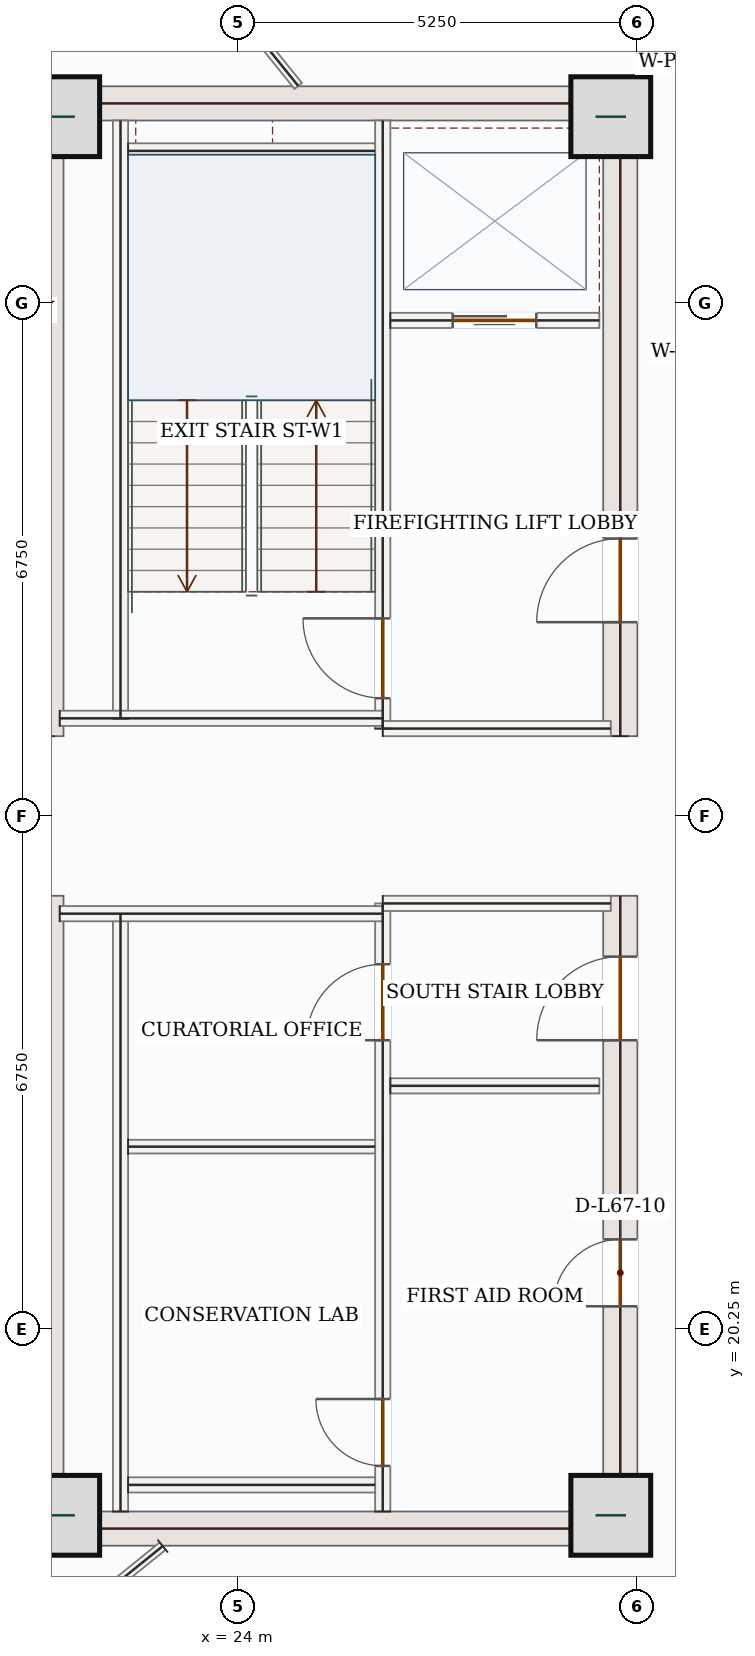
"""IFC4 building model, lengths in metres.
Left out: names, types, materials, properties, quantities, classifications, styles, units other than length and angle.
Written with IfcOpenShell. Run it as: python <this file> out.ifc"""

import sys

from ifc_helpers import new_model, si_unit, direction, frame, frame_2d, origin, origin_2d, place, context, subcontext, project, spatial, rectangle, extrude, source, transform, mapped, element, fill, save


model = new_model("IFC4")
c1 = context("Model", 3, precision=1e-05, world=origin(), true_north=direction((0.0, 1.0)))
c2 = subcontext(c1, "Body", "Model", "MODEL_VIEW")
j1 = project(units=[si_unit("LENGTHUNIT", "METRE"), si_unit("PLANEANGLEUNIT", "RADIAN")], contexts=[c1])
p1 = place(None, origin())
s1 = spatial("IfcSite", under=j1, at=p1, CompositionType="ELEMENT")
p2 = place(p1, origin())
s2 = spatial("IfcBuilding", under=s1, at=p2, CompositionType="ELEMENT")
p3 = place(p2, frame((0.0, 0.0, 280.35)))
s3 = spatial("IfcBuildingStorey", under=s2, at=p3, CompositionType="ELEMENT", Elevation=280.35)
m1 = source(origin(), c2, "Body", "SweptSolid", [
    extrude(rectangle(XDim=8.55, YDim=0.45, at=frame_2d((4.275, 0.0))), origin(), (0.0, 0.0, 1.0), 3.5),
])
for number, where, z_axis, x_axis in (
    (1, (21.475, 17.4, 0.0), (0.0, 0.0, 1.0), (0.0, 1.0, 0.0)),
    (2, (21.475, 28.05, 0.0), (0.0, 0.0, 1.0), (0.0, 1.0, 0.0)),
):
    element("IfcWall", number, at=place(p3, frame(where, z_axis=z_axis, x_axis=x_axis)), inside=s3, PredefinedType="SHEAR", context=c2, shape_type="MappedRepresentation", body=[
        mapped(m1, transform((0.0, 0.0, 0.0), x_axis=(1.0, 0.0, 0.0), y_axis=(0.0, 1.0, 0.0), z_axis=(0.0, 0.0, 1.0), scale=1.0)),
    ])
p4 = place(p3, frame((29.025, 17.4, 0.0), z_axis=(0.0, 0.0, 1.0), x_axis=(0.0, 1.0, 0.0)))
e3 = element("IfcWall", 3, at=p4, inside=s3, PredefinedType="SHEAR", context=c2, shape_type="SweptSolid", body=[
    extrude(rectangle(XDim=8.55, YDim=0.45, at=frame_2d((4.275, 0.0))), origin(), (0.0, 0.0, 1.0), 3.5),
])
p5 = place(p4, frame((6.65, 0.0, 0.0)))
e4 = element("IfcOpeningElement", 4, at=p5, cuts=e3, PredefinedType="OPENING", context=c2, shape_type="SweptSolid", body=[
    extrude(rectangle(XDim=1.1, YDim=2.2, at=frame_2d((0.55, 1.1))), frame((0.0, 0.235, 0.0), z_axis=(0.0, -1.0, 0.0), x_axis=(1.0, 0.0, 0.0)), (0.0, 0.0, 1.0), 0.47),
])
p6 = place(p4, frame((3.15, 0.0, 0.0)))
e5 = element("IfcOpeningElement", 5, at=p6, cuts=e3, PredefinedType="OPENING", context=c2, shape_type="SweptSolid", body=[
    extrude(rectangle(XDim=0.88, YDim=2.1, at=frame_2d((0.44, 1.05))), frame((0.0, 0.235, 0.0), z_axis=(0.0, -1.0, 0.0), x_axis=(1.0, 0.0, 0.0)), (0.0, 0.0, 1.0), 0.47),
])
p7 = place(p3, frame((29.025, 28.05, 0.0), z_axis=(0.0, 0.0, 1.0), x_axis=(0.0, 1.0, 0.0)))
e6 = element("IfcWall", 6, at=p7, inside=s3, PredefinedType="SHEAR", context=c2, shape_type="SweptSolid", body=[
    extrude(rectangle(XDim=8.55, YDim=0.45, at=frame_2d((4.275, 0.0))), origin(), (0.0, 0.0, 1.0), 3.5),
])
p8 = place(p7, frame((1.5, 0.0, 0.0)))
e7 = element("IfcOpeningElement", 7, at=p8, cuts=e6, PredefinedType="OPENING", context=c2, shape_type="SweptSolid", body=[
    extrude(rectangle(XDim=1.1, YDim=2.2, at=frame_2d((0.55, 1.1))), frame((0.0, 0.235, 0.0), z_axis=(0.0, -1.0, 0.0), x_axis=(1.0, 0.0, 0.0)), (0.0, 0.0, 1.0), 0.47),
])
m2 = source(origin(), c2, "Body", "SweptSolid", [
    extrude(rectangle(XDim=7.1, YDim=0.45, at=frame_2d((3.55, 0.0))), origin(), (0.0, 0.0, 1.0), 3.5),
])
for number, where, z_axis, x_axis in (
    (8, (21.7, 17.625, 0.0), (0.0, 0.0, 1.0), (1.0, 0.0, 0.0)),
    (9, (21.7, 36.375, 0.0), (0.0, 0.0, 1.0), (1.0, 0.0, 0.0)),
):
    element("IfcWall", number, at=place(p3, frame(where, z_axis=z_axis, x_axis=x_axis)), inside=s3, PredefinedType="SHEAR", context=c2, shape_type="MappedRepresentation", body=[
        mapped(m2, transform((0.0, 0.0, 0.0), x_axis=(1.0, 0.0, 0.0), y_axis=(0.0, 1.0, 0.0), z_axis=(0.0, 0.0, 1.0), scale=1.0)),
    ])
m3 = source(origin(), c2, "Body", "SweptSolid", [
    extrude(rectangle(XDim=1.05, YDim=1.05, at=origin_2d()), origin(), (0.0, 0.0, 1.0), 3.75),
])
for number, where, z_axis, x_axis in (
    (10, (21.65, 17.8, 0.0), (0.0, 0.0, 1.0), (1.0, 0.0, 0.0)),
    (11, (28.9, 17.8, 0.0), (0.0, 0.0, 1.0), (1.0, 0.0, 0.0)),
    (12, (21.65, 36.2, 0.0), (0.0, 0.0, 1.0), (1.0, 0.0, 0.0)),
    (13, (28.9, 36.2, 0.0), (0.0, 0.0, 1.0), (1.0, 0.0, 0.0)),
):
    element("IfcColumn", number, at=place(p3, frame(where, z_axis=z_axis, x_axis=x_axis)), inside=s3, PredefinedType="COLUMN", context=c2, shape_type="MappedRepresentation", body=[
        mapped(m3, transform((0.0, 0.0, 0.0), x_axis=(1.0, 0.0, 0.0), y_axis=(0.0, 1.0, 0.0), z_axis=(0.0, 0.0, 1.0), scale=1.0)),
    ])
m4 = source(origin(), c2, "Body", "SweptSolid", [
    extrude(rectangle(XDim=3.96, YDim=0.28, at=frame_2d((1.98, 0.0))), origin(), (0.0, 0.0, 1.0), 3.5),
])
p9 = place(p3, frame((21.74, 15.658, 0.0), z_axis=(0.0, 0.0, 1.0), x_axis=(-0.707106781187, 0.707106781187, 0.0)))
e14 = element("IfcWall", 14, at=p9, inside=s3, PredefinedType="SOLIDWALL", context=c2, shape_type="MappedRepresentation", body=[
    mapped(m4, transform((0.0, 0.0, 0.0), x_axis=(1.0, 0.0, 0.0), y_axis=(0.0, 1.0, 0.0), z_axis=(0.0, 0.0, 1.0), scale=1.0)),
])
m5 = source(origin(), c2, "Body", "SweptSolid", [
    extrude(rectangle(XDim=7.87, YDim=0.2, at=frame_2d((3.935, 0.0))), origin(), (0.0, 0.0, 1.0), 3.5),
])
for number, where, z_axis, x_axis in (
    (15, (22.45, 17.85, 0.0), (0.0, 0.0, 1.0), (0.0, 1.0, 0.0)),
    (16, (22.45, 28.28, 0.0), (0.0, 0.0, 1.0), (0.0, 1.0, 0.0)),
):
    element("IfcWall", number, at=place(p3, frame(where, z_axis=z_axis, x_axis=x_axis)), inside=s3, PredefinedType="SOLIDWALL", context=c2, shape_type="MappedRepresentation", body=[
        mapped(m5, transform((0.0, 0.0, 0.0), x_axis=(1.0, 0.0, 0.0), y_axis=(0.0, 1.0, 0.0), z_axis=(0.0, 0.0, 1.0), scale=1.0)),
    ])
p10 = place(p3, frame((25.9, 17.85, 0.0), z_axis=(0.0, 0.0, 1.0), x_axis=(0.0, 1.0, 0.0)))
e17 = element("IfcWall", 17, at=p10, inside=s3, PredefinedType="SOLIDWALL", context=c2, shape_type="SweptSolid", body=[
    extrude(rectangle(XDim=8.0, YDim=0.2, at=frame_2d((4.0, 0.0))), origin(), (0.0, 0.0, 1.0), 3.5),
])
p11 = place(p10, frame((6.2, 0.0, 0.0)))
e18 = element("IfcOpeningElement", 18, at=p11, cuts=e17, PredefinedType="OPENING", context=c2, shape_type="SweptSolid", body=[
    extrude(rectangle(XDim=1.0, YDim=2.15, at=frame_2d((0.5, 1.075))), frame((0.0, 0.11, 0.0), z_axis=(0.0, -1.0, 0.0), x_axis=(1.0, 0.0, 0.0)), (0.0, 0.0, 1.0), 0.22),
])
p12 = place(p10, frame((0.6, 0.0, 0.0)))
e19 = element("IfcOpeningElement", 19, at=p12, cuts=e17, PredefinedType="OPENING", context=c2, shape_type="SweptSolid", body=[
    extrude(rectangle(XDim=0.88, YDim=2.1, at=frame_2d((0.44, 1.05))), frame((0.0, 0.11, 0.0), z_axis=(0.0, -1.0, 0.0), x_axis=(1.0, 0.0, 0.0)), (0.0, 0.0, 1.0), 0.22),
])
p13 = place(p3, frame((25.9, 28.15, 0.0), z_axis=(0.0, 0.0, 1.0), x_axis=(0.0, 1.0, 0.0)))
e20 = element("IfcWall", 20, at=p13, inside=s3, PredefinedType="SOLIDWALL", context=c2, shape_type="SweptSolid", body=[
    extrude(rectangle(XDim=8.0, YDim=0.2, at=frame_2d((4.0, 0.0))), origin(), (0.0, 0.0, 1.0), 3.5),
])
p14 = place(p13, frame((0.4, 0.0, 0.0)))
e21 = element("IfcOpeningElement", 21, at=p14, cuts=e20, PredefinedType="OPENING", context=c2, shape_type="SweptSolid", body=[
    extrude(rectangle(XDim=1.05, YDim=2.15, at=frame_2d((0.525, 1.075))), frame((0.0, 0.11, 0.0), z_axis=(0.0, -1.0, 0.0), x_axis=(1.0, 0.0, 0.0)), (0.0, 0.0, 1.0), 0.22),
])
m6 = source(origin(), c2, "Body", "SweptSolid", [
    extrude(rectangle(XDim=4.25, YDim=0.2, at=frame_2d((2.125, 0.0))), origin(), (0.0, 0.0, 1.0), 3.5),
])
p15 = place(p3, frame((21.65, 25.715, 0.0), z_axis=(0.0, 0.0, 1.0), x_axis=(1.0, 0.0, 0.0)))
e22 = element("IfcWall", 22, at=p15, inside=s3, PredefinedType="SOLIDWALL", context=c2, shape_type="MappedRepresentation", body=[
    mapped(m6, transform((0.0, 0.0, 0.0), x_axis=(1.0, 0.0, 0.0), y_axis=(0.0, 1.0, 0.0), z_axis=(0.0, 0.0, 1.0), scale=1.0)),
])
m7 = source(origin(), c2, "Body", "SweptSolid", [
    extrude(rectangle(XDim=3.0, YDim=0.2, at=frame_2d((1.5, 0.0))), origin(), (0.0, 0.0, 1.0), 3.5),
])
p16 = place(p3, frame((25.9, 25.85, 0.0), z_axis=(0.0, 0.0, 1.0), x_axis=(1.0, 0.0, 0.0)))
e23 = element("IfcWall", 23, at=p16, inside=s3, PredefinedType="SOLIDWALL", context=c2, shape_type="MappedRepresentation", body=[
    mapped(m7, transform((0.0, 0.0, 0.0), x_axis=(1.0, 0.0, 0.0), y_axis=(0.0, 1.0, 0.0), z_axis=(0.0, 0.0, 1.0), scale=1.0)),
])
p17 = place(p3, frame((21.65, 28.285, 0.0), z_axis=(0.0, 0.0, 1.0), x_axis=(1.0, 0.0, 0.0)))
e24 = element("IfcWall", 24, at=p17, inside=s3, PredefinedType="SOLIDWALL", context=c2, shape_type="MappedRepresentation", body=[
    mapped(m6, transform((0.0, 0.0, 0.0), x_axis=(1.0, 0.0, 0.0), y_axis=(0.0, 1.0, 0.0), z_axis=(0.0, 0.0, 1.0), scale=1.0)),
])
p18 = place(p3, frame((25.9, 28.15, 0.0), z_axis=(0.0, 0.0, 1.0), x_axis=(1.0, 0.0, 0.0)))
e25 = element("IfcWall", 25, at=p18, inside=s3, PredefinedType="SOLIDWALL", context=c2, shape_type="MappedRepresentation", body=[
    mapped(m7, transform((0.0, 0.0, 0.0), x_axis=(1.0, 0.0, 0.0), y_axis=(0.0, 1.0, 0.0), z_axis=(0.0, 0.0, 1.0), scale=1.0)),
])
m8 = source(origin(), c2, "Body", "SweptSolid", [
    extrude(rectangle(XDim=3.25, YDim=0.2, at=frame_2d((1.625, 0.0))), origin(), (0.0, 0.0, 1.0), 3.5),
])
for number, where, z_axis, x_axis in (
    (26, (22.55, 35.75, 0.0), (0.0, 0.0, 1.0), (1.0, 0.0, 0.0)),
    (27, (22.55, 18.2, 0.0), (0.0, 0.0, 1.0), (1.0, 0.0, 0.0)),
):
    element("IfcWall", number, at=place(p3, frame(where, z_axis=z_axis, x_axis=x_axis)), inside=s3, PredefinedType="SOLIDWALL", context=c2, shape_type="MappedRepresentation", body=[
        mapped(m8, transform((0.0, 0.0, 0.0), x_axis=(1.0, 0.0, 0.0), y_axis=(0.0, 1.0, 0.0), z_axis=(0.0, 0.0, 1.0), scale=1.0)),
    ])
m9 = source(origin(), c2, "Body", "SweptSolid", [
    extrude(rectangle(XDim=3.25, YDim=0.18, at=frame_2d((1.625, 0.0))), origin(), (0.0, 0.0, 1.0), 3.5),
])
p19 = place(p3, frame((22.55, 22.65, 0.0), z_axis=(0.0, 0.0, 1.0), x_axis=(1.0, 0.0, 0.0)))
e28 = element("IfcWall", 28, at=p19, inside=s3, PredefinedType="PARTITIONING", context=c2, shape_type="MappedRepresentation", body=[
    mapped(m9, transform((0.0, 0.0, 0.0), x_axis=(1.0, 0.0, 0.0), y_axis=(0.0, 1.0, 0.0), z_axis=(0.0, 0.0, 1.0), scale=1.0)),
])
p20 = place(p3, frame((26.0, 33.52, 0.0), z_axis=(0.0, 0.0, 1.0), x_axis=(1.0, 0.0, 0.0)))
e29 = element("IfcWall", 29, at=p20, inside=s3, PredefinedType="SOLIDWALL", context=c2, shape_type="SweptSolid", body=[
    extrude(rectangle(XDim=2.75, YDim=0.2, at=frame_2d((1.375, 0.0))), origin(), (0.0, 0.0, 1.0), 3.5),
])
p21 = place(p20, frame((0.82, 0.0, 0.0)))
e30 = element("IfcOpeningElement", 30, at=p21, cuts=e29, PredefinedType="OPENING", context=c2, shape_type="SweptSolid", body=[
    extrude(rectangle(XDim=1.1, YDim=2.15, at=frame_2d((0.55, 1.075))), frame((0.0, 0.11, 0.0), z_axis=(0.0, -1.0, 0.0), x_axis=(1.0, 0.0, 0.0)), (0.0, 0.0, 1.0), 0.22),
])
m10 = source(origin(), c2, "Body", "SweptSolid", [
    extrude(rectangle(XDim=2.75, YDim=0.2, at=frame_2d((1.375, 0.0))), origin(), (0.0, 0.0, 1.0), 3.5),
])
p22 = place(p3, frame((26.0, 23.45, 0.0), z_axis=(0.0, 0.0, 1.0), x_axis=(1.0, 0.0, 0.0)))
e31 = element("IfcWall", 31, at=p22, inside=s3, PredefinedType="SOLIDWALL", context=c2, shape_type="MappedRepresentation", body=[
    mapped(m10, transform((0.0, 0.0, 0.0), x_axis=(1.0, 0.0, 0.0), y_axis=(0.0, 1.0, 0.0), z_axis=(0.0, 0.0, 1.0), scale=1.0)),
])
m11 = source(origin(), c2, "Body", "SweptSolid", [
    extrude(rectangle(XDim=1.989, YDim=0.125, at=frame_2d((0.995, 0.0))), origin(), (0.0, 0.0, 1.0), 3.5),
])
p23 = place(p3, frame((23.005, 17.395, 0.0), z_axis=(0.0, 0.0, 1.0), x_axis=(-0.778058853423, -0.628191388519, 0.0)))
e32 = element("IfcWall", 32, at=p23, inside=s3, PredefinedType="PARTITIONING", context=c2, shape_type="MappedRepresentation", body=[
    mapped(m11, transform((0.0, 0.0, 0.0), x_axis=(1.0, 0.0, 0.0), y_axis=(0.0, 1.0, 0.0), z_axis=(0.0, 0.0, 1.0), scale=1.0)),
])
m12 = source(origin(), c2, "Body", "SweptSolid", [
    extrude(rectangle(XDim=2.089, YDim=0.125, at=frame_2d((1.045, 0.0))), origin(), (0.0, 0.0, 1.0), 3.5),
])
p24 = place(p3, frame((23.475, 38.231, 0.0), z_axis=(0.0, 0.0, 1.0), x_axis=(0.628165745158, -0.778079556735, 0.0)))
e33 = element("IfcWall", 33, at=p24, inside=s3, PredefinedType="PARTITIONING", context=c2, shape_type="MappedRepresentation", body=[
    mapped(m12, transform((0.0, 0.0, 0.0), x_axis=(1.0, 0.0, 0.0), y_axis=(0.0, 1.0, 0.0), z_axis=(0.0, 0.0, 1.0), scale=1.0)),
])
m13 = source(origin(), c2, "Body", "SweptSolid", [
    extrude(rectangle(XDim=1.05, YDim=2.15, at=frame_2d((0.525, 1.075))), frame((0.0, 0.025, 0.0), z_axis=(0.0, -1.0, 0.0), x_axis=(1.0, 0.0, 0.0)), (0.0, 0.0, 1.0), 0.05),
])
p25 = place(p14, origin())
e34 = element("IfcDoor", 34, at=p25, inside=s3, OperationType="SINGLE_SWING_RIGHT", PredefinedType="DOOR", context=c2, shape_type="MappedRepresentation", body=[
    mapped(m13, transform((0.0, 0.0, 0.0), x_axis=(1.0, 0.0, 0.0), y_axis=(0.0, 1.0, 0.0), z_axis=(0.0, 0.0, 1.0), scale=1.0)),
])
fill(e21, e34)
m14 = source(origin(), c2, "Body", "SweptSolid", [
    extrude(rectangle(XDim=1.0, YDim=2.15, at=frame_2d((0.5, 1.075))), frame((0.0, 0.025, 0.0), z_axis=(0.0, -1.0, 0.0), x_axis=(1.0, 0.0, 0.0)), (0.0, 0.0, 1.0), 0.05),
])
p26 = place(p11, origin())
e35 = element("IfcDoor", 35, at=p26, inside=s3, OperationType="SINGLE_SWING_LEFT", PredefinedType="DOOR", context=c2, shape_type="MappedRepresentation", body=[
    mapped(m14, transform((0.0, 0.0, 0.0), x_axis=(1.0, 0.0, 0.0), y_axis=(0.0, 1.0, 0.0), z_axis=(0.0, 0.0, 1.0), scale=1.0)),
])
fill(e18, e35)
m15 = source(origin(), c2, "Body", "SweptSolid", [
    extrude(rectangle(XDim=0.88, YDim=2.1, at=frame_2d((0.44, 1.05))), frame((0.0, 0.025, 0.0), z_axis=(0.0, -1.0, 0.0), x_axis=(1.0, 0.0, 0.0)), (0.0, 0.0, 1.0), 0.05),
])
p27 = place(p12, origin())
e36 = element("IfcDoor", 36, at=p27, inside=s3, OperationType="SINGLE_SWING_RIGHT", PredefinedType="DOOR", context=c2, shape_type="MappedRepresentation", body=[
    mapped(m15, transform((0.0, 0.0, 0.0), x_axis=(1.0, 0.0, 0.0), y_axis=(0.0, 1.0, 0.0), z_axis=(0.0, 0.0, 1.0), scale=1.0)),
])
fill(e19, e36)
m16 = source(origin(), c2, "Body", "SweptSolid", [
    extrude(rectangle(XDim=1.1, YDim=2.15, at=frame_2d((0.55, 1.075))), frame((0.0, 0.025, 0.0), z_axis=(0.0, -1.0, 0.0), x_axis=(1.0, 0.0, 0.0)), (0.0, 0.0, 1.0), 0.05),
])
p28 = place(p21, origin())
e37 = element("IfcDoor", 37, at=p28, inside=s3, OperationType="DOUBLE_DOOR_SLIDING", PredefinedType="DOOR", context=c2, shape_type="MappedRepresentation", body=[
    mapped(m16, transform((0.0, 0.0, 0.0), x_axis=(1.0, 0.0, 0.0), y_axis=(0.0, 1.0, 0.0), z_axis=(0.0, 0.0, 1.0), scale=1.0)),
])
fill(e30, e37)
m17 = source(origin(), c2, "Body", "SweptSolid", [
    extrude(rectangle(XDim=1.1, YDim=2.2, at=frame_2d((0.55, 1.1))), frame((0.0, 0.025, 0.0), z_axis=(0.0, -1.0, 0.0), x_axis=(1.0, 0.0, 0.0)), (0.0, 0.0, 1.0), 0.05),
])
p29 = place(p8, origin())
e38 = element("IfcDoor", 38, at=p29, inside=s3, OperationType="SINGLE_SWING_LEFT", PredefinedType="DOOR", context=c2, shape_type="MappedRepresentation", body=[
    mapped(m17, transform((0.0, 0.0, 0.0), x_axis=(1.0, 0.0, 0.0), y_axis=(0.0, 1.0, 0.0), z_axis=(0.0, 0.0, 1.0), scale=1.0)),
])
fill(e7, e38)
p30 = place(p5, origin())
e39 = element("IfcDoor", 39, at=p30, inside=s3, OperationType="SINGLE_SWING_LEFT", PredefinedType="DOOR", context=c2, shape_type="MappedRepresentation", body=[
    mapped(m17, transform((0.0, 0.0, 0.0), x_axis=(1.0, 0.0, 0.0), y_axis=(0.0, 1.0, 0.0), z_axis=(0.0, 0.0, 1.0), scale=1.0)),
])
fill(e4, e39)
p31 = place(p6, origin())
e40 = element("IfcDoor", 40, at=p31, inside=s3, OperationType="SINGLE_SWING_LEFT", PredefinedType="DOOR", context=c2, shape_type="MappedRepresentation", body=[
    mapped(m15, transform((0.0, 0.0, 0.0), x_axis=(1.0, 0.0, 0.0), y_axis=(0.0, 1.0, 0.0), z_axis=(0.0, 0.0, 1.0), scale=1.0)),
])
fill(e5, e40)
save(model, sys.argv[1])
